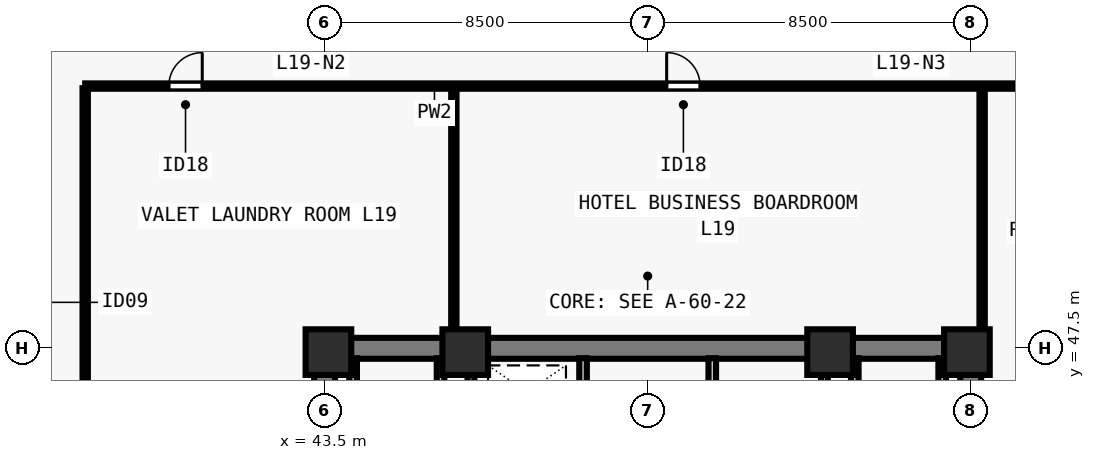
"""IFC4 building model, lengths in metres.
Left out: names, types, materials, properties, quantities, classifications, styles, units other than length and angle.
Written with IfcOpenShell. Run it as: python <this file> out.ifc"""

import sys

from ifc_helpers import new_model, si_unit, direction, frame, frame_2d, origin, origin_2d, place, context, subcontext, project, spatial, rectangle, extrude, element, fill, save


model = new_model("IFC4")
c1 = context("Model", 3, precision=1e-05, world=origin(), true_north=direction((0.0, 1.0)))
c2 = subcontext(c1, "Body", "Model", "MODEL_VIEW")
j1 = project(units=[si_unit("LENGTHUNIT", "METRE"), si_unit("PLANEANGLEUNIT", "RADIAN")], contexts=[c1])
p1 = place(None, origin())
s1 = spatial("IfcSite", under=j1, at=p1, CompositionType="ELEMENT")
p2 = place(p1, origin())
s2 = spatial("IfcBuilding", under=s1, at=p2, CompositionType="ELEMENT")
p3 = place(p2, frame((0.0, 0.0, 72.5)))
s3 = spatial("IfcBuildingStorey", under=s2, at=p3, CompositionType="ELEMENT", Elevation=72.5)
for number, where, z_axis, x_axis in (
    (1, (43.6, 47.4, 0.0), (0.0, 0.0, 1.0), (1.0, 0.0, 0.0)),
    (2, (47.2, 47.4, 0.0), (0.0, 0.0, 1.0), (1.0, 0.0, 0.0)),
    (3, (56.8, 47.4, 0.0), (0.0, 0.0, 1.0), (1.0, 0.0, 0.0)),
    (4, (60.4, 47.4, 0.0), (0.0, 0.0, 1.0), (1.0, 0.0, 0.0)),
):
    element("IfcColumn", number, at=place(p3, frame(where, z_axis=z_axis, x_axis=x_axis)), inside=s3, PredefinedType="COLUMN", context=c2, shape_type="SweptSolid", body=[
        extrude(rectangle(XDim=1.2, YDim=1.2, at=origin_2d()), origin(), (0.0, 0.0, 1.0), 3.5),
    ])
p4 = place(p3, frame((43.225, 47.5, 0.0), z_axis=(0.0, 0.0, 1.0), x_axis=(1.0, 0.0, 0.0)))
e5 = element("IfcWall", 5, at=p4, inside=s3, PredefinedType="SHEAR", context=c2, shape_type="SweptSolid", body=[
    extrude(rectangle(XDim=17.55, YDim=0.55, at=frame_2d((8.775, 0.0))), origin(), (0.0, 0.0, 1.0), 3.28),
])
for number, where, z_axis, x_axis in (
    (6, (43.5, 40.8, 0.0), (0.0, 0.0, 1.0), (0.0, 1.0, 0.0)),
    (7, (60.5, 40.8, 0.0), (0.0, 0.0, 1.0), (0.0, 1.0, 0.0)),
):
    element("IfcWall", number, at=place(p3, frame(where, z_axis=z_axis, x_axis=x_axis)), inside=s3, PredefinedType="SHEAR", context=c2, shape_type="SweptSolid", body=[
        extrude(rectangle(XDim=6.435, YDim=0.55, at=frame_2d((3.218, 0.0))), origin(), (0.0, 0.0, 1.0), 3.28),
    ])
p5 = place(p3, frame((50.3, 40.585, 0.0), z_axis=(0.0, 0.0, 1.0), x_axis=(0.0, 1.0, 0.0)))
e8 = element("IfcWall", 8, at=p5, inside=s3, PredefinedType="SOLIDWALL", context=c2, shape_type="SweptSolid", body=[
    extrude(rectangle(XDim=6.655, YDim=0.2, at=frame_2d((3.328, 0.0))), origin(), (0.0, 0.0, 1.0), 3.28),
])
p6 = place(p5, frame((5.065, 0.0, 0.0)))
e9 = element("IfcOpeningElement", 9, at=p6, cuts=e8, PredefinedType="OPENING", context=c2, shape_type="SweptSolid", body=[
    extrude(rectangle(XDim=0.8, YDim=2.08, at=frame_2d((0.4, 1.04))), frame((0.0, 0.11, 0.0), z_axis=(0.0, -1.0, 0.0), x_axis=(1.0, 0.0, 0.0)), (0.0, 0.0, 1.0), 0.22),
])
p7 = place(p3, frame((53.7, 40.585, 0.0), z_axis=(0.0, 0.0, 1.0), x_axis=(0.0, 1.0, 0.0)))
e10 = element("IfcWall", 10, at=p7, inside=s3, PredefinedType="SOLIDWALL", context=c2, shape_type="SweptSolid", body=[
    extrude(rectangle(XDim=6.655, YDim=0.2, at=frame_2d((3.328, 0.0))), origin(), (0.0, 0.0, 1.0), 3.28),
])
p8 = place(p7, frame((0.195, 0.0, 0.0)))
e11 = element("IfcOpeningElement", 11, at=p8, cuts=e10, PredefinedType="OPENING", context=c2, shape_type="SweptSolid", body=[
    extrude(rectangle(XDim=0.8, YDim=2.08, at=frame_2d((0.4, 1.04))), frame((0.0, 0.11, 0.0), z_axis=(0.0, -1.0, 0.0), x_axis=(1.0, 0.0, 0.0)), (0.0, 0.0, 1.0), 0.22),
])
p9 = place(p7, frame((4.265, 0.0, 0.0)))
e12 = element("IfcOpeningElement", 12, at=p9, cuts=e10, PredefinedType="OPENING", context=c2, shape_type="SweptSolid", body=[
    extrude(rectangle(XDim=0.95, YDim=2.12, at=frame_2d((0.475, 1.06))), frame((0.0, 0.11, 0.0), z_axis=(0.0, -1.0, 0.0), x_axis=(1.0, 0.0, 0.0)), (0.0, 0.0, 1.0), 0.22),
])
for number, where, z_axis, x_axis in (
    (13, (46.55, 43.735, 0.0), (0.0, 0.0, 1.0), (0.0, 1.0, 0.0)),
    (14, (44.25, 43.735, 0.0), (0.0, 0.0, 1.0), (0.0, 1.0, 0.0)),
    (15, (57.45, 43.735, 0.0), (0.0, 0.0, 1.0), (0.0, 1.0, 0.0)),
    (16, (59.75, 43.735, 0.0), (0.0, 0.0, 1.0), (0.0, 1.0, 0.0)),
):
    element("IfcWall", number, at=place(p3, frame(where, z_axis=z_axis, x_axis=x_axis)), inside=s3, PredefinedType="SOLIDWALL", context=c2, shape_type="SweptSolid", body=[
        extrude(rectangle(XDim=3.505, YDim=0.2, at=frame_2d((1.752, 0.0))), origin(), (0.0, 0.0, 1.0), 3.28),
    ])
for number, where, z_axis, x_axis in (
    (17, (47.35, 43.735, 0.0), (0.0, 0.0, 1.0), (0.0, 1.0, 0.0)),
    (18, (56.65, 43.735, 0.0), (0.0, 0.0, 1.0), (0.0, 1.0, 0.0)),
):
    element("IfcWall", number, at=place(p3, frame(where, z_axis=z_axis, x_axis=x_axis)), inside=s3, PredefinedType="SOLIDWALL", context=c2, shape_type="SweptSolid", body=[
        extrude(rectangle(XDim=3.505, YDim=0.18, at=frame_2d((1.752, 0.0))), origin(), (0.0, 0.0, 1.0), 3.28),
    ])
p10 = place(p3, frame((37.2, 54.4, 0.0), z_axis=(0.0, 0.0, 1.0), x_axis=(1.0, 0.0, 0.0)))
e19 = element("IfcWall", 19, at=p10, inside=s3, PredefinedType="PARTITIONING", context=c2, shape_type="SweptSolid", body=[
    extrude(rectangle(XDim=29.6, YDim=0.14, at=frame_2d((14.8, 0.0))), origin(), (0.0, 0.0, 1.0), 3.28),
])
p11 = place(p10, frame((2.2, 0.0, 0.0)))
e20 = element("IfcOpeningElement", 20, at=p11, cuts=e19, PredefinedType="OPENING", context=c2, shape_type="SweptSolid", body=[
    extrude(rectangle(XDim=0.88, YDim=2.1, at=frame_2d((0.44, 1.05))), frame((0.0, 0.08, 0.0), z_axis=(0.0, -1.0, 0.0), x_axis=(1.0, 0.0, 0.0)), (0.0, 0.0, 1.0), 0.16),
])
p12 = place(p10, frame((15.3, 0.0, 0.0)))
e21 = element("IfcOpeningElement", 21, at=p12, cuts=e19, PredefinedType="OPENING", context=c2, shape_type="SweptSolid", body=[
    extrude(rectangle(XDim=0.88, YDim=2.1, at=frame_2d((0.44, 1.05))), frame((0.0, 0.08, 0.0), z_axis=(0.0, -1.0, 0.0), x_axis=(1.0, 0.0, 0.0)), (0.0, 0.0, 1.0), 0.16),
])
p13 = place(p10, frame((24.8, 0.0, 0.0)))
e22 = element("IfcOpeningElement", 22, at=p13, cuts=e19, PredefinedType="OPENING", context=c2, shape_type="SweptSolid", body=[
    extrude(rectangle(XDim=0.88, YDim=2.1, at=frame_2d((0.44, 1.05))), frame((0.0, 0.08, 0.0), z_axis=(0.0, -1.0, 0.0), x_axis=(1.0, 0.0, 0.0)), (0.0, 0.0, 1.0), 0.16),
])
p14 = place(p3, frame((37.2, 40.8, 0.0), z_axis=(0.0, 0.0, 1.0), x_axis=(0.0, 1.0, 0.0)))
e23 = element("IfcWall", 23, at=p14, inside=s3, PredefinedType="PARTITIONING", context=c2, shape_type="SweptSolid", body=[
    extrude(rectangle(XDim=13.545, YDim=0.14, at=frame_2d((6.772, 0.0))), origin(), (0.0, 0.0, 1.0), 3.28),
])
p15 = place(p14, frame((2.5, 0.0, 0.0)))
e24 = element("IfcOpeningElement", 24, at=p15, cuts=e23, PredefinedType="OPENING", context=c2, shape_type="SweptSolid", body=[
    extrude(rectangle(XDim=0.88, YDim=2.1, at=frame_2d((0.44, 1.05))), frame((0.0, 0.08, 0.0), z_axis=(0.0, -1.0, 0.0), x_axis=(1.0, 0.0, 0.0)), (0.0, 0.0, 1.0), 0.16),
])
p16 = place(p3, frame((46.9, 47.76, 0.0), z_axis=(0.0, 0.0, 1.0), x_axis=(0.0, 1.0, 0.0)))
e25 = element("IfcWall", 25, at=p16, inside=s3, PredefinedType="PARTITIONING", context=c2, shape_type="SweptSolid", body=[
    extrude(rectangle(XDim=6.585, YDim=0.14, at=frame_2d((3.292, 0.0))), origin(), (0.0, 0.0, 1.0), 3.28),
])
p17 = place(p3, frame((60.8, 47.76, 0.0), z_axis=(0.0, 0.0, 1.0), x_axis=(0.0, 1.0, 0.0)))
e26 = element("IfcWall", 26, at=p17, inside=s3, PredefinedType="PARTITIONING", context=c2, shape_type="SweptSolid", body=[
    extrude(rectangle(XDim=6.585, YDim=0.14, at=frame_2d((3.292, 0.0))), origin(), (0.0, 0.0, 1.0), 2.439),
])
p18 = place(p11, origin())
e27 = element("IfcDoor", 27, at=p18, inside=s3, OperationType="SINGLE_SWING_RIGHT", PredefinedType="DOOR", context=c2, shape_type="SweptSolid", body=[
    extrude(rectangle(XDim=0.88, YDim=2.1, at=frame_2d((0.44, 1.05))), frame((0.0, 0.025, 0.0), z_axis=(0.0, -1.0, 0.0), x_axis=(1.0, 0.0, 0.0)), (0.0, 0.0, 1.0), 0.05),
])
fill(e20, e27)
p19 = place(p12, origin())
e28 = element("IfcDoor", 28, at=p19, inside=s3, OperationType="SINGLE_SWING_LEFT", PredefinedType="DOOR", context=c2, shape_type="SweptSolid", body=[
    extrude(rectangle(XDim=0.88, YDim=2.1, at=frame_2d((0.44, 1.05))), frame((0.0, 0.025, 0.0), z_axis=(0.0, -1.0, 0.0), x_axis=(1.0, 0.0, 0.0)), (0.0, 0.0, 1.0), 0.05),
])
fill(e21, e28)
save(model, sys.argv[1])
